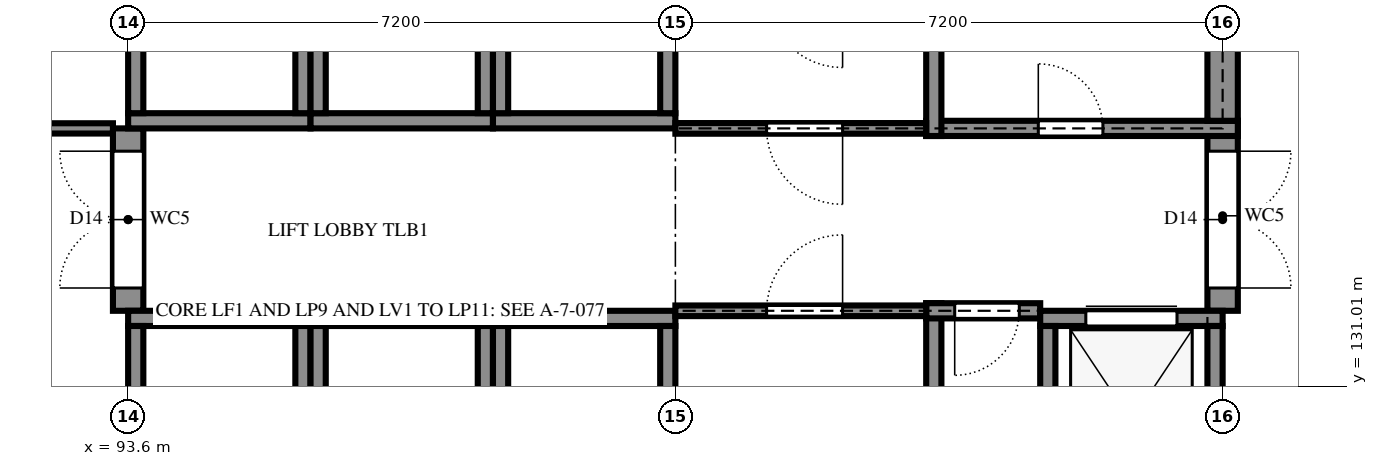
"""IFC4 building model, lengths in metres.
Left out: names, types, materials, properties, quantities, classifications, styles, units other than length and angle.
Written with IfcOpenShell. Run it as: python <this file> out.ifc"""

import sys

from ifc_helpers import new_model, si_unit, direction, frame, frame_2d, origin, place, context, subcontext, project, spatial, rectangle, extrude, element, fill, save


model = new_model("IFC4")
c1 = context("Model", 3, precision=1e-05, world=origin(), true_north=direction((0.0, 1.0)))
c2 = subcontext(c1, "Body", "Model", "MODEL_VIEW")
j1 = project(units=[si_unit("LENGTHUNIT", "METRE"), si_unit("PLANEANGLEUNIT", "RADIAN")], contexts=[c1])
p1 = place(None, origin())
s1 = spatial("IfcSite", under=j1, at=p1, CompositionType="ELEMENT")
p2 = place(p1, origin())
s2 = spatial("IfcBuilding", under=s1, at=p2, CompositionType="ELEMENT")
p3 = place(p2, origin())
s3 = spatial("IfcBuildingStorey", under=s2, at=p3, CompositionType="ELEMENT", Elevation=0.0)
p4 = place(p3, frame((93.6, 132.0, 0.0), z_axis=(0.0, 0.0, 1.0), x_axis=(0.0, 1.0, 0.0)))
e1 = element("IfcWall", 1, at=p4, inside=s3, PredefinedType="SHEAR", context=c2, shape_type="SweptSolid", body=[
    extrude(rectangle(XDim=2.4, YDim=0.4, at=frame_2d((1.2, 0.0))), origin(), (0.0, 0.0, 1.0), 3.6),
])
p5 = place(p4, frame((0.3, 0.0, 0.0)))
e2 = element("IfcOpeningElement", 2, at=p5, cuts=e1, PredefinedType="OPENING", context=c2, shape_type="SweptSolid", body=[
    extrude(rectangle(XDim=1.8, YDim=2.1, at=frame_2d((0.9, 1.05))), frame((0.0, 0.21, 0.0), z_axis=(0.0, -1.0, 0.0), x_axis=(1.0, 0.0, 0.0)), (0.0, 0.0, 1.0), 0.42),
])
p6 = place(p3, frame((104.2, 132.1, 0.0), z_axis=(0.0, 0.0, 1.0), x_axis=(0.0, -1.0, 0.0)))
e3 = element("IfcWall", 3, at=p6, inside=s3, PredefinedType="SHEAR", context=c2, shape_type="SweptSolid", body=[
    extrude(rectangle(XDim=3.525, YDim=0.2, at=frame_2d((1.763, 0.0))), origin(), (0.0, 0.0, 1.0), 3.6),
])
p7 = place(p3, frame((105.6, 132.0, 0.0), z_axis=(0.0, 0.0, 1.0), x_axis=(-1.0, 0.0, 0.0)))
e4 = element("IfcWall", 4, at=p7, inside=s3, PredefinedType="SHEAR", context=c2, shape_type="SweptSolid", body=[
    extrude(rectangle(XDim=1.5, YDim=0.2, at=frame_2d((0.75, 0.0))), origin(), (0.0, 0.0, 1.0), 3.6),
])
p8 = place(p7, frame((0.275, 0.0, 0.0)))
e5 = element("IfcOpeningElement", 5, at=p8, cuts=e4, PredefinedType="OPENING", context=c2, shape_type="SweptSolid", body=[
    extrude(rectangle(XDim=0.85, YDim=2.1, at=frame_2d((0.425, 1.05))), frame((0.0, 0.11, 0.0), z_axis=(0.0, -1.0, 0.0), x_axis=(1.0, 0.0, 0.0)), (0.0, 0.0, 1.0), 0.22),
])
p9 = place(p3, frame((108.0, 132.0, 0.0), z_axis=(0.0, 0.0, 1.0), x_axis=(0.0, 1.0, 0.0)))
e6 = element("IfcWall", 6, at=p9, inside=s3, PredefinedType="SHEAR", context=c2, shape_type="SweptSolid", body=[
    extrude(rectangle(XDim=2.5, YDim=0.4, at=frame_2d((1.25, 0.0))), origin(), (0.0, 0.0, 1.0), 3.6),
])
p10 = place(p9, frame((0.3, 0.0, 0.0)))
e7 = element("IfcOpeningElement", 7, at=p10, cuts=e6, PredefinedType="OPENING", context=c2, shape_type="SweptSolid", body=[
    extrude(rectangle(XDim=1.8, YDim=2.1, at=frame_2d((0.9, 1.05))), frame((0.0, 0.21, 0.0), z_axis=(0.0, -1.0, 0.0), x_axis=(1.0, 0.0, 0.0)), (0.0, 0.0, 1.0), 0.42),
])
p11 = place(p3, frame((104.1, 134.4, 0.0), z_axis=(0.0, 0.0, 1.0), x_axis=(1.0, 0.0, 0.0)))
e8 = element("IfcWall", 8, at=p11, inside=s3, PredefinedType="SHEAR", context=c2, shape_type="SweptSolid", body=[
    extrude(rectangle(XDim=4.1, YDim=0.2, at=frame_2d((2.05, 0.0))), origin(), (0.0, 0.0, 1.0), 3.6),
])
p12 = place(p11, frame((1.475, 0.0, 0.0)))
e9 = element("IfcOpeningElement", 9, at=p12, cuts=e8, PredefinedType="OPENING", context=c2, shape_type="SweptSolid", body=[
    extrude(rectangle(XDim=0.85, YDim=2.1, at=frame_2d((0.425, 1.05))), frame((0.0, 0.11, 0.0), z_axis=(0.0, -1.0, 0.0), x_axis=(1.0, 0.0, 0.0)), (0.0, 0.0, 1.0), 0.22),
])
p13 = place(p3, frame((108.0, 134.5, 0.0), z_axis=(0.0, 0.0, 1.0), x_axis=(0.0, 1.0, 0.0)))
e10 = element("IfcWall", 10, at=p13, inside=s3, PredefinedType="SHEAR", context=c2, shape_type="SweptSolid", body=[
    extrude(rectangle(XDim=2.9, YDim=0.4, at=frame_2d((1.45, 0.0))), origin(), (0.0, 0.0, 1.0), 3.6),
])
p14 = place(p3, frame((104.2, 137.4, 0.0), z_axis=(0.0, 0.0, 1.0), x_axis=(0.0, -1.0, 0.0)))
e11 = element("IfcWall", 11, at=p14, inside=s3, PredefinedType="SHEAR", context=c2, shape_type="SweptSolid", body=[
    extrude(rectangle(XDim=3.1, YDim=0.2, at=frame_2d((1.55, 0.0))), origin(), (0.0, 0.0, 1.0), 3.6),
])
p15 = place(p3, frame((93.6, 131.9, 0.0), z_axis=(0.0, 0.0, 1.0), x_axis=(1.0, 0.0, 0.0)))
e12 = element("IfcWall", 12, at=p15, inside=s3, PredefinedType="SHEAR", context=c2, shape_type="SweptSolid", body=[
    extrude(rectangle(XDim=2.4, YDim=0.2, at=frame_2d((1.2, 0.0))), origin(), (0.0, 0.0, 1.0), 3.6),
])
for number, where, z_axis, x_axis in (
    (13, (93.7, 129.6, 0.0), (0.0, 0.0, 1.0), (0.0, 1.0, 0.0)),
    (14, (95.9, 129.6, 0.0), (0.0, 0.0, 1.0), (0.0, 1.0, 0.0)),
):
    element("IfcWall", number, at=place(p3, frame(where, z_axis=z_axis, x_axis=x_axis)), inside=s3, PredefinedType="SHEAR", context=c2, shape_type="SweptSolid", body=[
        extrude(rectangle(XDim=2.2, YDim=0.2, at=frame_2d((1.1, 0.0))), origin(), (0.0, 0.0, 1.0), 3.6),
    ])
p16 = place(p3, frame((96.0, 131.9, 0.0), z_axis=(0.0, 0.0, 1.0), x_axis=(1.0, 0.0, 0.0)))
e15 = element("IfcWall", 15, at=p16, inside=s3, PredefinedType="SHEAR", context=c2, shape_type="SweptSolid", body=[
    extrude(rectangle(XDim=2.4, YDim=0.2, at=frame_2d((1.2, 0.0))), origin(), (0.0, 0.0, 1.0), 3.6),
])
for number, where, z_axis, x_axis in (
    (16, (96.1, 129.6, 0.0), (0.0, 0.0, 1.0), (0.0, 1.0, 0.0)),
    (17, (98.3, 129.6, 0.0), (0.0, 0.0, 1.0), (0.0, 1.0, 0.0)),
):
    element("IfcWall", number, at=place(p3, frame(where, z_axis=z_axis, x_axis=x_axis)), inside=s3, PredefinedType="SHEAR", context=c2, shape_type="SweptSolid", body=[
        extrude(rectangle(XDim=2.2, YDim=0.2, at=frame_2d((1.1, 0.0))), origin(), (0.0, 0.0, 1.0), 3.6),
    ])
p17 = place(p3, frame((98.4, 131.9, 0.0), z_axis=(0.0, 0.0, 1.0), x_axis=(1.0, 0.0, 0.0)))
e18 = element("IfcWall", 18, at=p17, inside=s3, PredefinedType="SHEAR", context=c2, shape_type="SweptSolid", body=[
    extrude(rectangle(XDim=2.4, YDim=0.2, at=frame_2d((1.2, 0.0))), origin(), (0.0, 0.0, 1.0), 3.6),
])
for number, where, z_axis, x_axis in (
    (19, (98.5, 129.6, 0.0), (0.0, 0.0, 1.0), (0.0, 1.0, 0.0)),
    (20, (100.7, 129.6, 0.0), (0.0, 0.0, 1.0), (0.0, 1.0, 0.0)),
):
    element("IfcWall", number, at=place(p3, frame(where, z_axis=z_axis, x_axis=x_axis)), inside=s3, PredefinedType="SHEAR", context=c2, shape_type="SweptSolid", body=[
        extrude(rectangle(XDim=2.2, YDim=0.2, at=frame_2d((1.1, 0.0))), origin(), (0.0, 0.0, 1.0), 3.6),
    ])
p18 = place(p3, frame((93.6, 134.5, 0.0), z_axis=(0.0, 0.0, 1.0), x_axis=(1.0, 0.0, 0.0)))
e21 = element("IfcWall", 21, at=p18, inside=s3, PredefinedType="SHEAR", context=c2, shape_type="SweptSolid", body=[
    extrude(rectangle(XDim=2.4, YDim=0.2, at=frame_2d((1.2, 0.0))), origin(), (0.0, 0.0, 1.0), 3.6),
])
for number, where, z_axis, x_axis in (
    (22, (93.7, 134.6, 0.0), (0.0, 0.0, 1.0), (0.0, 1.0, 0.0)),
    (23, (95.9, 134.6, 0.0), (0.0, 0.0, 1.0), (0.0, 1.0, 0.0)),
):
    element("IfcWall", number, at=place(p3, frame(where, z_axis=z_axis, x_axis=x_axis)), inside=s3, PredefinedType="SHEAR", context=c2, shape_type="SweptSolid", body=[
        extrude(rectangle(XDim=2.2, YDim=0.2, at=frame_2d((1.1, 0.0))), origin(), (0.0, 0.0, 1.0), 3.6),
    ])
p19 = place(p3, frame((96.0, 134.5, 0.0), z_axis=(0.0, 0.0, 1.0), x_axis=(1.0, 0.0, 0.0)))
e24 = element("IfcWall", 24, at=p19, inside=s3, PredefinedType="SHEAR", context=c2, shape_type="SweptSolid", body=[
    extrude(rectangle(XDim=2.4, YDim=0.2, at=frame_2d((1.2, 0.0))), origin(), (0.0, 0.0, 1.0), 3.6),
])
for number, where, z_axis, x_axis in (
    (25, (96.1, 134.6, 0.0), (0.0, 0.0, 1.0), (0.0, 1.0, 0.0)),
    (26, (98.3, 134.6, 0.0), (0.0, 0.0, 1.0), (0.0, 1.0, 0.0)),
):
    element("IfcWall", number, at=place(p3, frame(where, z_axis=z_axis, x_axis=x_axis)), inside=s3, PredefinedType="SHEAR", context=c2, shape_type="SweptSolid", body=[
        extrude(rectangle(XDim=2.2, YDim=0.2, at=frame_2d((1.1, 0.0))), origin(), (0.0, 0.0, 1.0), 3.6),
    ])
p20 = place(p3, frame((98.4, 134.5, 0.0), z_axis=(0.0, 0.0, 1.0), x_axis=(1.0, 0.0, 0.0)))
e27 = element("IfcWall", 27, at=p20, inside=s3, PredefinedType="SHEAR", context=c2, shape_type="SweptSolid", body=[
    extrude(rectangle(XDim=2.4, YDim=0.2, at=frame_2d((1.2, 0.0))), origin(), (0.0, 0.0, 1.0), 3.6),
])
for number, where, z_axis, x_axis in (
    (28, (98.5, 134.6, 0.0), (0.0, 0.0, 1.0), (0.0, 1.0, 0.0)),
    (29, (100.7, 134.6, 0.0), (0.0, 0.0, 1.0), (0.0, 1.0, 0.0)),
):
    element("IfcWall", number, at=place(p3, frame(where, z_axis=z_axis, x_axis=x_axis)), inside=s3, PredefinedType="SHEAR", context=c2, shape_type="SweptSolid", body=[
        extrude(rectangle(XDim=2.2, YDim=0.2, at=frame_2d((1.1, 0.0))), origin(), (0.0, 0.0, 1.0), 3.6),
    ])
p21 = place(p3, frame((105.6, 131.9, -1.4), z_axis=(0.0, 0.0, 1.0), x_axis=(1.0, 0.0, 0.0)))
e30 = element("IfcWall", 30, at=p21, inside=s3, PredefinedType="SHEAR", context=c2, shape_type="SweptSolid", body=[
    extrude(rectangle(XDim=2.4, YDim=0.2, at=frame_2d((1.2, 0.0))), origin(), (0.0, 0.0, 1.0), 5.0),
])
p22 = place(p21, frame((0.6, 0.0, 1.4)))
e31 = element("IfcOpeningElement", 31, at=p22, cuts=e30, PredefinedType="OPENING", context=c2, shape_type="SweptSolid", body=[
    extrude(rectangle(XDim=1.2, YDim=2.1, at=frame_2d((0.6, 1.05))), frame((0.0, 0.11, 0.0), z_axis=(0.0, -1.0, 0.0), x_axis=(1.0, 0.0, 0.0)), (0.0, 0.0, 1.0), 0.22),
])
for number, where, z_axis, x_axis in (
    (32, (105.7, 129.3, -1.4), (0.0, 0.0, 1.0), (0.0, 1.0, 0.0)),
    (33, (107.9, 129.3, -1.4), (0.0, 0.0, 1.0), (0.0, 1.0, 0.0)),
):
    element("IfcWall", number, at=place(p3, frame(where, z_axis=z_axis, x_axis=x_axis)), inside=s3, PredefinedType="SHEAR", context=c2, shape_type="SweptSolid", body=[
        extrude(rectangle(XDim=2.5, YDim=0.2, at=frame_2d((1.25, 0.0))), origin(), (0.0, 0.0, 1.0), 5.0),
    ])
p23 = place(p3, frame((100.8, 132.0, 0.0), z_axis=(0.0, 0.0, 1.0), x_axis=(1.0, 0.0, 0.0)))
e34 = element("IfcWall", 34, at=p23, inside=s3, PredefinedType="PARTITIONING", context=c2, shape_type="SweptSolid", body=[
    extrude(rectangle(XDim=3.3, YDim=0.14, at=frame_2d((1.65, 0.0))), origin(), (0.0, 0.0, 1.0), 3.42),
])
p24 = place(p23, frame((1.2, 0.0, 0.0)))
e35 = element("IfcOpeningElement", 35, at=p24, cuts=e34, PredefinedType="OPENING", context=c2, shape_type="SweptSolid", body=[
    extrude(rectangle(XDim=1.0, YDim=2.1, at=frame_2d((0.5, 1.05))), frame((0.0, 0.08, 0.0), z_axis=(0.0, -1.0, 0.0), x_axis=(1.0, 0.0, 0.0)), (0.0, 0.0, 1.0), 0.16),
])
p25 = place(p3, frame((75.542, 134.4, 0.0), z_axis=(0.0, 0.0, 1.0), x_axis=(1.0, 0.0, 0.0)))
e36 = element("IfcWall", 36, at=p25, inside=s3, PredefinedType="PARTITIONING", context=c2, shape_type="SweptSolid", body=[
    extrude(rectangle(XDim=17.857, YDim=0.135, at=frame_2d((8.929, 0.0))), origin(), (0.0, 0.0, 1.0), 3.12),
])
p26 = place(p25, frame((7.958, 0.0, 0.0)))
e37 = element("IfcOpeningElement", 37, at=p26, cuts=e36, PredefinedType="OPENING", context=c2, shape_type="SweptSolid", body=[
    extrude(rectangle(XDim=1.0, YDim=2.4, at=frame_2d((0.5, 1.2))), frame((0.0, 0.077, 0.0), z_axis=(0.0, -1.0, 0.0), x_axis=(1.0, 0.0, 0.0)), (0.0, 0.0, 1.0), 0.155),
])
p27 = place(p3, frame((100.8, 134.4, 0.0), z_axis=(0.0, 0.0, 1.0), x_axis=(1.0, 0.0, 0.0)))
e38 = element("IfcWall", 38, at=p27, inside=s3, PredefinedType="PARTITIONING", context=c2, shape_type="SweptSolid", body=[
    extrude(rectangle(XDim=3.3, YDim=0.14, at=frame_2d((1.65, 0.0))), origin(), (0.0, 0.0, 1.0), 3.42),
])
p28 = place(p27, frame((1.2, 0.0, 0.0)))
e39 = element("IfcOpeningElement", 39, at=p28, cuts=e38, PredefinedType="OPENING", context=c2, shape_type="SweptSolid", body=[
    extrude(rectangle(XDim=1.0, YDim=2.1, at=frame_2d((0.5, 1.05))), frame((0.0, 0.08, 0.0), z_axis=(0.0, -1.0, 0.0), x_axis=(1.0, 0.0, 0.0)), (0.0, 0.0, 1.0), 0.16),
])
p29 = place(p22, origin())
e40 = element("IfcDoor", 40, at=p29, inside=s3, OperationType="SLIDING_TO_LEFT", PredefinedType="DOOR", context=c2, shape_type="SweptSolid", body=[
    extrude(rectangle(XDim=1.2, YDim=2.1, at=frame_2d((0.6, 1.05))), frame((0.0, 0.025, 0.0), z_axis=(0.0, -1.0, 0.0), x_axis=(1.0, 0.0, 0.0)), (0.0, 0.0, 1.0), 0.05),
])
fill(e31, e40)
p30 = place(p24, origin())
e41 = element("IfcDoor", 41, at=p30, inside=s3, OperationType="SINGLE_SWING_LEFT", PredefinedType="DOOR", context=c2, shape_type="SweptSolid", body=[
    extrude(rectangle(XDim=1.0, YDim=2.1, at=frame_2d((0.5, 1.05))), frame((0.0, 0.025, 0.0), z_axis=(0.0, -1.0, 0.0), x_axis=(1.0, 0.0, 0.0)), (0.0, 0.0, 1.0), 0.05),
])
fill(e35, e41)
p31 = place(p28, frame((1.0, 0.0, 0.0), z_axis=(0.0, 0.0, 1.0), x_axis=(-1.0, 0.0, 0.0)))
e42 = element("IfcDoor", 42, at=p31, inside=s3, OperationType="SINGLE_SWING_RIGHT", PredefinedType="DOOR", context=c2, shape_type="SweptSolid", body=[
    extrude(rectangle(XDim=1.0, YDim=2.1, at=frame_2d((0.5, 1.05))), frame((0.0, 0.025, 0.0), z_axis=(0.0, -1.0, 0.0), x_axis=(1.0, 0.0, 0.0)), (0.0, 0.0, 1.0), 0.05),
])
fill(e39, e42)
p32 = place(p8, origin())
e43 = element("IfcDoor", 43, at=p32, inside=s3, OperationType="SINGLE_SWING_LEFT", PredefinedType="DOOR", context=c2, shape_type="SweptSolid", body=[
    extrude(rectangle(XDim=0.85, YDim=2.1, at=frame_2d((0.425, 1.05))), frame((0.0, 0.025, 0.0), z_axis=(0.0, -1.0, 0.0), x_axis=(1.0, 0.0, 0.0)), (0.0, 0.0, 1.0), 0.05),
])
fill(e5, e43)
p33 = place(p12, origin())
e44 = element("IfcDoor", 44, at=p33, inside=s3, OperationType="SINGLE_SWING_RIGHT", PredefinedType="DOOR", context=c2, shape_type="SweptSolid", body=[
    extrude(rectangle(XDim=0.85, YDim=2.1, at=frame_2d((0.425, 1.05))), frame((0.0, 0.025, 0.0), z_axis=(0.0, -1.0, 0.0), x_axis=(1.0, 0.0, 0.0)), (0.0, 0.0, 1.0), 0.05),
])
fill(e9, e44)
p34 = place(p5, origin())
e45 = element("IfcDoor", 45, at=p34, inside=s3, OperationType="DOUBLE_DOOR_SINGLE_SWING", PredefinedType="DOOR", context=c2, shape_type="SweptSolid", body=[
    extrude(rectangle(XDim=1.8, YDim=2.1, at=frame_2d((0.9, 1.05))), frame((0.0, 0.025, 0.0), z_axis=(0.0, -1.0, 0.0), x_axis=(1.0, 0.0, 0.0)), (0.0, 0.0, 1.0), 0.05),
])
fill(e2, e45)
p35 = place(p10, frame((1.8, 0.0, 0.0), z_axis=(0.0, 0.0, 1.0), x_axis=(-1.0, 0.0, 0.0)))
e46 = element("IfcDoor", 46, at=p35, inside=s3, OperationType="DOUBLE_DOOR_SINGLE_SWING", PredefinedType="DOOR", context=c2, shape_type="SweptSolid", body=[
    extrude(rectangle(XDim=1.8, YDim=2.1, at=frame_2d((0.9, 1.05))), frame((0.0, 0.025, 0.0), z_axis=(0.0, -1.0, 0.0), x_axis=(1.0, 0.0, 0.0)), (0.0, 0.0, 1.0), 0.05),
])
fill(e7, e46)
save(model, sys.argv[1])
